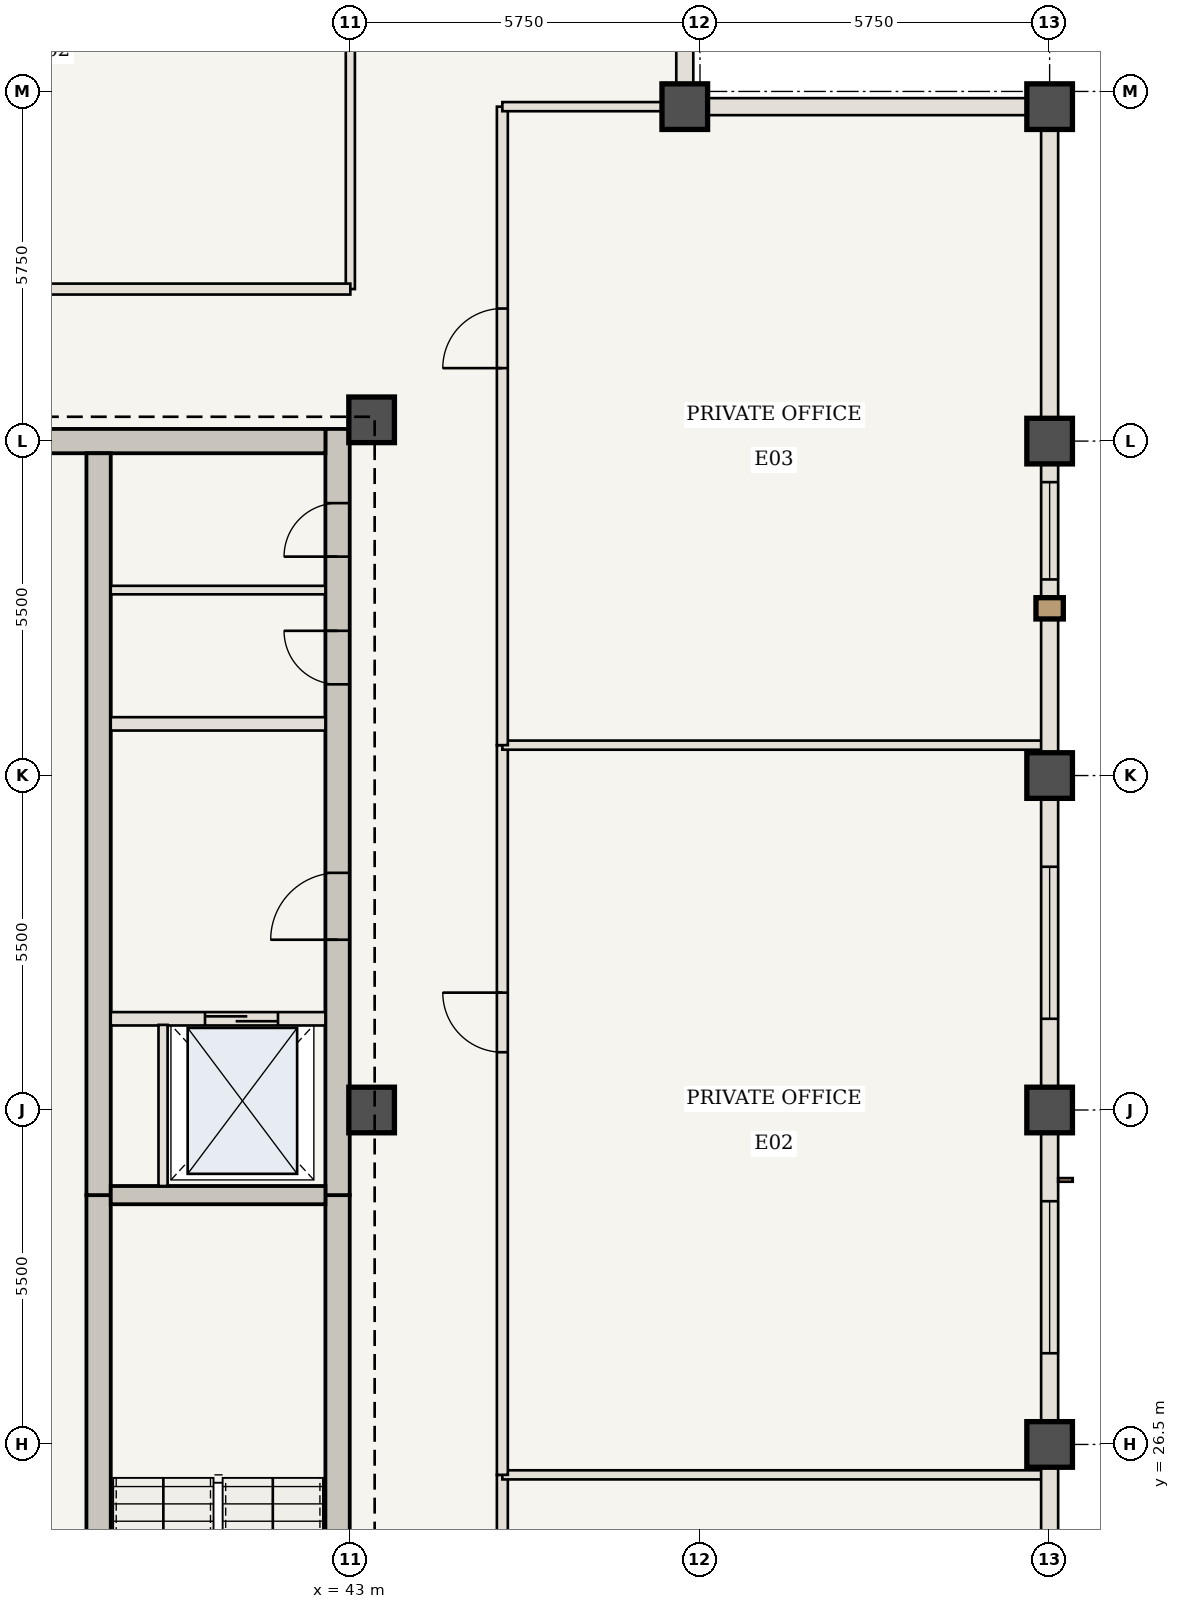
"""IFC4 building model, lengths in metres.
Left out: names, types, materials, properties, quantities, classifications, styles, units other than length and angle.
Written with IfcOpenShell. Run it as: python <this file> out.ifc"""

import sys

from ifc_helpers import new_model, si_unit, direction, frame, frame_2d, origin, origin_2d, place, context, subcontext, project, spatial, rectangle, extrude, element, fill, save


model = new_model("IFC4")
c1 = context("Model", 3, precision=1e-05, world=origin(), true_north=direction((0.0, 1.0)))
c2 = subcontext(c1, "Body", "Model", "MODEL_VIEW")
j1 = project(units=[si_unit("LENGTHUNIT", "METRE"), si_unit("PLANEANGLEUNIT", "RADIAN")], contexts=[c1])
p1 = place(None, origin())
s1 = spatial("IfcSite", under=j1, at=p1, CompositionType="ELEMENT")
p2 = place(p1, origin())
s2 = spatial("IfcBuilding", under=s1, at=p2, CompositionType="ELEMENT")
p3 = place(p2, frame((0.0, 0.0, 262.15)))
s3 = spatial("IfcBuildingStorey", under=s2, at=p3, CompositionType="ELEMENT", Elevation=262.15)
p4 = place(p3, frame((42.79, 20.75, 0.0), z_axis=(0.0, 0.0, 1.0), x_axis=(0.0, 1.0, 0.0)))
e1 = element("IfcWall", 1, at=p4, inside=s3, PredefinedType="SHEAR", context=c2, shape_type="SweptSolid", body=[
    extrude(rectangle(XDim=9.85, YDim=0.4, at=frame_2d((4.925, 0.0))), origin(), (0.0, 0.0, 1.0), 3.85),
])
p5 = place(p4, frame((1.0, 0.0, 0.0)))
e2 = element("IfcOpeningElement", 2, at=p5, cuts=e1, PredefinedType="OPENING", context=c2, shape_type="SweptSolid", body=[
    extrude(rectangle(XDim=1.15, YDim=2.15, at=frame_2d((0.575, 1.075))), frame((0.0, 0.21, 0.0), z_axis=(0.0, -1.0, 0.0), x_axis=(1.0, 0.0, 0.0)), (0.0, 0.0, 1.0), 0.42),
])
p6 = place(p3, frame((42.79, 30.6, 0.0), z_axis=(0.0, 0.0, 1.0), x_axis=(0.0, 1.0, 0.0)))
e3 = element("IfcWall", 3, at=p6, inside=s3, PredefinedType="SHEAR", context=c2, shape_type="SweptSolid", body=[
    extrude(rectangle(XDim=12.6, YDim=0.4, at=frame_2d((6.3, 0.0))), origin(), (0.0, 0.0, 1.0), 3.85),
])
p7 = place(p6, frame((4.2, 0.0, 0.0)))
e4 = element("IfcOpeningElement", 4, at=p7, cuts=e3, PredefinedType="OPENING", context=c2, shape_type="SweptSolid", body=[
    extrude(rectangle(XDim=1.1, YDim=2.15, at=frame_2d((0.55, 1.075))), frame((0.0, 0.21, 0.0), z_axis=(0.0, -1.0, 0.0), x_axis=(1.0, 0.0, 0.0)), (0.0, 0.0, 1.0), 0.42),
])
p8 = place(p6, frame((8.4, 0.0, 0.0)))
e5 = element("IfcOpeningElement", 5, at=p8, cuts=e3, PredefinedType="OPENING", context=c2, shape_type="SweptSolid", body=[
    extrude(rectangle(XDim=0.88, YDim=2.1, at=frame_2d((0.44, 1.05))), frame((0.0, 0.21, 0.0), z_axis=(0.0, -1.0, 0.0), x_axis=(1.0, 0.0, 0.0)), (0.0, 0.0, 1.0), 0.42),
])
p9 = place(p6, frame((10.5, 0.0, 0.0)))
e6 = element("IfcOpeningElement", 6, at=p9, cuts=e3, PredefinedType="OPENING", context=c2, shape_type="SweptSolid", body=[
    extrude(rectangle(XDim=0.88, YDim=2.1, at=frame_2d((0.44, 1.05))), frame((0.0, 0.21, 0.0), z_axis=(0.0, -1.0, 0.0), x_axis=(1.0, 0.0, 0.0)), (0.0, 0.0, 1.0), 0.42),
])
p10 = place(p3, frame((37.75, 43.0, 0.0), z_axis=(0.0, 0.0, 1.0), x_axis=(1.0, 0.0, 0.0)))
e7 = element("IfcWall", 7, at=p10, inside=s3, PredefinedType="SHEAR", context=c2, shape_type="SweptSolid", body=[
    extrude(rectangle(XDim=4.84, YDim=0.4, at=frame_2d((2.42, 0.0))), origin(), (0.0, 0.0, 1.0), 3.85),
])
p11 = place(p3, frame((38.86, 21.15, 0.0), z_axis=(0.0, 0.0, 1.0), x_axis=(0.0, 1.0, 0.0)))
e8 = element("IfcWall", 8, at=p11, inside=s3, PredefinedType="SHEAR", context=c2, shape_type="SweptSolid", body=[
    extrude(rectangle(XDim=9.45, YDim=0.4, at=frame_2d((4.725, 0.0))), origin(), (0.0, 0.0, 1.0), 3.85),
])
p12 = place(p3, frame((38.86, 30.6, 0.0), z_axis=(0.0, 0.0, 1.0), x_axis=(0.0, 1.0, 0.0)))
e9 = element("IfcWall", 9, at=p12, inside=s3, PredefinedType="SHEAR", context=c2, shape_type="SweptSolid", body=[
    extrude(rectangle(XDim=12.2, YDim=0.4, at=frame_2d((6.1, 0.0))), origin(), (0.0, 0.0, 1.0), 3.85),
])
for number, where, z_axis, x_axis in (
    (10, (43.35, 32.0, 0.0), (0.0, 0.0, 1.0), (1.0, 0.0, 0.0)),
    (11, (43.35, 43.35, 0.0), (0.0, 0.0, 1.0), (1.0, 0.0, 0.0)),
    (12, (54.5, 48.5, 0.0), (0.0, 0.0, 1.0), (1.0, 0.0, 0.0)),
    (13, (48.5, 48.5, 0.0), (0.0, 0.0, 1.0), (1.0, 0.0, 0.0)),
    (14, (54.5, 26.5, 0.0), (0.0, 0.0, 1.0), (1.0, 0.0, 0.0)),
    (15, (54.5, 32.0, 0.0), (0.0, 0.0, 1.0), (1.0, 0.0, 0.0)),
    (16, (54.5, 37.5, 0.0), (0.0, 0.0, 1.0), (1.0, 0.0, 0.0)),
    (17, (54.5, 43.0, 0.0), (0.0, 0.0, 1.0), (1.0, 0.0, 0.0)),
):
    element("IfcColumn", number, at=place(p3, frame(where, z_axis=z_axis, x_axis=x_axis)), inside=s3, PredefinedType="COLUMN", context=c2, shape_type="SweptSolid", body=[
        extrude(rectangle(XDim=0.75, YDim=0.75, at=origin_2d()), origin(), (0.0, 0.0, 1.0), 3.85),
    ])
p13 = place(p3, frame((39.06, 30.6, 0.0), z_axis=(0.0, 0.0, 1.0), x_axis=(1.0, 0.0, 0.0)))
e18 = element("IfcWall", 18, at=p13, inside=s3, PredefinedType="SHEAR", context=c2, shape_type="SweptSolid", body=[
    extrude(rectangle(XDim=3.53, YDim=0.3, at=frame_2d((1.765, 0.0))), origin(), (0.0, 0.0, 1.0), 3.43),
])
p14 = place(p3, frame((39.06, 33.5, 0.0), z_axis=(0.0, 0.0, 1.0), x_axis=(1.0, 0.0, 0.0)))
e19 = element("IfcWall", 19, at=p14, inside=s3, PredefinedType="STANDARD", context=c2, shape_type="SweptSolid", body=[
    extrude(rectangle(XDim=3.53, YDim=0.22, at=frame_2d((1.765, 0.0))), origin(), (0.0, 0.0, 1.0), 3.43),
])
p15 = place(p14, frame((1.55, 0.0, 0.0)))
e20 = element("IfcOpeningElement", 20, at=p15, cuts=e19, PredefinedType="OPENING", context=c2, shape_type="SweptSolid", body=[
    extrude(rectangle(XDim=1.2, YDim=2.2, at=frame_2d((0.6, 1.1))), frame((0.0, 0.12, 0.0), z_axis=(0.0, -1.0, 0.0), x_axis=(1.0, 0.0, 0.0)), (0.0, 0.0, 1.0), 0.24),
])
p16 = place(p3, frame((39.92, 30.75, 0.0), z_axis=(0.0, 0.0, 1.0), x_axis=(0.0, 1.0, 0.0)))
e21 = element("IfcWall", 21, at=p16, inside=s3, PredefinedType="STANDARD", context=c2, shape_type="SweptSolid", body=[
    extrude(rectangle(XDim=2.65, YDim=0.15, at=frame_2d((1.325, 0.0))), origin(), (0.0, 0.0, 1.0), 3.43),
])
p17 = place(p3, frame((39.06, 38.35, 0.0), z_axis=(0.0, 0.0, 1.0), x_axis=(1.0, 0.0, 0.0)))
e22 = element("IfcWall", 22, at=p17, inside=s3, PredefinedType="STANDARD", context=c2, shape_type="SweptSolid", body=[
    extrude(rectangle(XDim=3.53, YDim=0.22, at=frame_2d((1.765, 0.0))), origin(), (0.0, 0.0, 1.0), 3.43),
])
p18 = place(p3, frame((39.06, 40.55, 0.0), z_axis=(0.0, 0.0, 1.0), x_axis=(1.0, 0.0, 0.0)))
e23 = element("IfcWall", 23, at=p18, inside=s3, PredefinedType="STANDARD", context=c2, shape_type="SweptSolid", body=[
    extrude(rectangle(XDim=3.53, YDim=0.14, at=frame_2d((1.765, 0.0))), origin(), (0.0, 0.0, 1.0), 3.43),
])
p19 = place(p3, frame((43.0, 45.5, 0.0), z_axis=(0.0, 0.0, 1.0), x_axis=(0.0, 1.0, 0.0)))
e24 = element("IfcWall", 24, at=p19, inside=s3, PredefinedType="STANDARD", context=c2, shape_type="SweptSolid", body=[
    extrude(rectangle(XDim=8.94, YDim=0.15, at=frame_2d((4.47, 0.0))), origin(), (0.0, 0.0, 1.0), 3.43),
])
p20 = place(p3, frame((31.5, 45.5, 0.0), z_axis=(0.0, 0.0, 1.0), x_axis=(1.0, 0.0, 0.0)))
e25 = element("IfcWall", 25, at=p20, inside=s3, PredefinedType="STANDARD", context=c2, shape_type="SweptSolid", body=[
    extrude(rectangle(XDim=11.5, YDim=0.18, at=frame_2d((5.75, 0.0))), origin(), (0.0, 0.0, 1.0), 3.43),
])
p21 = place(p20, frame((5.225, 0.0, 0.0)))
e26 = element("IfcOpeningElement", 26, at=p21, cuts=e25, PredefinedType="OPENING", context=c2, shape_type="SweptSolid", body=[
    extrude(rectangle(XDim=0.98, YDim=2.2, at=frame_2d((0.49, 1.1))), frame((0.0, 0.1, 0.0), z_axis=(0.0, -1.0, 0.0), x_axis=(1.0, 0.0, 0.0)), (0.0, 0.0, 1.0), 0.2),
])
p22 = place(p3, frame((45.5, 15.5, 0.0), z_axis=(0.0, 0.0, 1.0), x_axis=(0.0, 1.0, 0.0)))
e27 = element("IfcWall", 27, at=p22, inside=s3, PredefinedType="STANDARD", context=c2, shape_type="SweptSolid", body=[
    extrude(rectangle(XDim=10.5, YDim=0.18, at=frame_2d((5.25, 0.0))), origin(), (0.0, 0.0, 1.0), 3.43),
])
p23 = place(p22, frame((6.2, 0.0, 0.0)))
e28 = element("IfcOpeningElement", 28, at=p23, cuts=e27, PredefinedType="OPENING", context=c2, shape_type="SweptSolid", body=[
    extrude(rectangle(XDim=0.98, YDim=2.2, at=frame_2d((0.49, 1.1))), frame((0.0, 0.1, 0.0), z_axis=(0.0, -1.0, 0.0), x_axis=(1.0, 0.0, 0.0)), (0.0, 0.0, 1.0), 0.2),
])
p24 = place(p3, frame((45.5, 26.0, 0.0), z_axis=(0.0, 0.0, 1.0), x_axis=(1.0, 0.0, 0.0)))
e29 = element("IfcWall", 29, at=p24, inside=s3, PredefinedType="STANDARD", context=c2, shape_type="SweptSolid", body=[
    extrude(rectangle(XDim=8.94, YDim=0.15, at=frame_2d((4.47, 0.0))), origin(), (0.0, 0.0, 1.0), 3.43),
])
p25 = place(p3, frame((45.5, 26.0, 0.0), z_axis=(0.0, 0.0, 1.0), x_axis=(0.0, 1.0, 0.0)))
e30 = element("IfcWall", 30, at=p25, inside=s3, PredefinedType="STANDARD", context=c2, shape_type="SweptSolid", body=[
    extrude(rectangle(XDim=12.0, YDim=0.18, at=frame_2d((6.0, 0.0))), origin(), (0.0, 0.0, 1.0), 3.43),
])
p26 = place(p25, frame((6.95, 0.0, 0.0)))
e31 = element("IfcOpeningElement", 31, at=p26, cuts=e30, PredefinedType="OPENING", context=c2, shape_type="SweptSolid", body=[
    extrude(rectangle(XDim=0.98, YDim=2.2, at=frame_2d((0.49, 1.1))), frame((0.0, 0.1, 0.0), z_axis=(0.0, -1.0, 0.0), x_axis=(1.0, 0.0, 0.0)), (0.0, 0.0, 1.0), 0.2),
])
p27 = place(p3, frame((45.5, 38.0, 0.0), z_axis=(0.0, 0.0, 1.0), x_axis=(1.0, 0.0, 0.0)))
e32 = element("IfcWall", 32, at=p27, inside=s3, PredefinedType="STANDARD", context=c2, shape_type="SweptSolid", body=[
    extrude(rectangle(XDim=8.94, YDim=0.15, at=frame_2d((4.47, 0.0))), origin(), (0.0, 0.0, 1.0), 3.43),
])
p28 = place(p3, frame((45.5, 38.0, 0.0), z_axis=(0.0, 0.0, 1.0), x_axis=(0.0, 1.0, 0.0)))
e33 = element("IfcWall", 33, at=p28, inside=s3, PredefinedType="STANDARD", context=c2, shape_type="SweptSolid", body=[
    extrude(rectangle(XDim=10.5, YDim=0.18, at=frame_2d((5.25, 0.0))), origin(), (0.0, 0.0, 1.0), 3.43),
])
p29 = place(p28, frame((6.2, 0.0, 0.0)))
e34 = element("IfcOpeningElement", 34, at=p29, cuts=e33, PredefinedType="OPENING", context=c2, shape_type="SweptSolid", body=[
    extrude(rectangle(XDim=0.98, YDim=2.2, at=frame_2d((0.49, 1.1))), frame((0.0, 0.1, 0.0), z_axis=(0.0, -1.0, 0.0), x_axis=(1.0, 0.0, 0.0)), (0.0, 0.0, 1.0), 0.2),
])
p30 = place(p3, frame((45.5, 48.5, 0.0), z_axis=(0.0, 0.0, 1.0), x_axis=(1.0, 0.0, 0.0)))
e35 = element("IfcWall", 35, at=p30, inside=s3, PredefinedType="STANDARD", context=c2, shape_type="SweptSolid", body=[
    extrude(rectangle(XDim=3.0, YDim=0.15, at=frame_2d((1.5, 0.0))), origin(), (0.0, 0.0, 1.0), 3.43),
])
p31 = place(p3, frame((54.5, 26.5, 0.0), z_axis=(0.0, 0.0, 1.0), x_axis=(0.0, -1.0, 0.0)))
e36 = element("IfcWall", 36, at=p31, inside=s3, PredefinedType="USERDEFINED", context=c2, shape_type="SweptSolid", body=[
    extrude(rectangle(XDim=5.5, YDim=0.28, at=frame_2d((2.75, 0.0))), origin(), (0.0, 0.0, 1.0), 2.73),
])
p32 = place(p31, frame((3.225, 0.0, 0.85)))
e37 = element("IfcOpeningElement", 37, at=p32, cuts=e36, PredefinedType="OPENING", context=c2, shape_type="SweptSolid", body=[
    extrude(rectangle(XDim=1.6, YDim=1.68, at=frame_2d((0.8, 0.84))), frame((0.0, 0.15, 0.0), z_axis=(0.0, -1.0, 0.0), x_axis=(1.0, 0.0, 0.0)), (0.0, 0.0, 1.0), 0.3),
])
p33 = place(p3, frame((54.5, 32.0, 0.0), z_axis=(0.0, 0.0, 1.0), x_axis=(0.0, -1.0, 0.0)))
e38 = element("IfcWall", 38, at=p33, inside=s3, PredefinedType="USERDEFINED", context=c2, shape_type="SweptSolid", body=[
    extrude(rectangle(XDim=5.5, YDim=0.28, at=frame_2d((2.75, 0.0))), origin(), (0.0, 0.0, 1.0), 2.73),
])
p34 = place(p33, frame((1.5, 0.0, 0.85)))
e39 = element("IfcOpeningElement", 39, at=p34, cuts=e38, PredefinedType="OPENING", context=c2, shape_type="SweptSolid", body=[
    extrude(rectangle(XDim=2.5, YDim=1.68, at=frame_2d((1.25, 0.84))), frame((0.0, 0.15, 0.0), z_axis=(0.0, -1.0, 0.0), x_axis=(1.0, 0.0, 0.0)), (0.0, 0.0, 1.0), 0.3),
])
p35 = place(p3, frame((54.5, 37.5, 0.0), z_axis=(0.0, 0.0, 1.0), x_axis=(0.0, -1.0, 0.0)))
e40 = element("IfcWall", 40, at=p35, inside=s3, PredefinedType="USERDEFINED", context=c2, shape_type="SweptSolid", body=[
    extrude(rectangle(XDim=5.5, YDim=0.28, at=frame_2d((2.75, 0.0))), origin(), (0.0, 0.0, 1.0), 2.73),
])
p36 = place(p35, frame((1.5, 0.0, 0.85)))
e41 = element("IfcOpeningElement", 41, at=p36, cuts=e40, PredefinedType="OPENING", context=c2, shape_type="SweptSolid", body=[
    extrude(rectangle(XDim=2.5, YDim=1.68, at=frame_2d((1.25, 0.84))), frame((0.0, 0.15, 0.0), z_axis=(0.0, -1.0, 0.0), x_axis=(1.0, 0.0, 0.0)), (0.0, 0.0, 1.0), 0.3),
])
p37 = place(p3, frame((54.5, 43.0, 0.0), z_axis=(0.0, 0.0, 1.0), x_axis=(0.0, -1.0, 0.0)))
e42 = element("IfcWall", 42, at=p37, inside=s3, PredefinedType="USERDEFINED", context=c2, shape_type="SweptSolid", body=[
    extrude(rectangle(XDim=5.5, YDim=0.28, at=frame_2d((2.75, 0.0))), origin(), (0.0, 0.0, 1.0), 2.73),
])
p38 = place(p37, frame((0.675, 0.0, 0.85)))
e43 = element("IfcOpeningElement", 43, at=p38, cuts=e42, PredefinedType="OPENING", context=c2, shape_type="SweptSolid", body=[
    extrude(rectangle(XDim=1.6, YDim=1.68, at=frame_2d((0.8, 0.84))), frame((0.0, 0.15, 0.0), z_axis=(0.0, -1.0, 0.0), x_axis=(1.0, 0.0, 0.0)), (0.0, 0.0, 1.0), 0.3),
])
p39 = place(p3, frame((54.5, 48.5, 0.0), z_axis=(0.0, 0.0, 1.0), x_axis=(0.0, -1.0, 0.0)))
e44 = element("IfcWall", 44, at=p39, inside=s3, PredefinedType="USERDEFINED", context=c2, shape_type="SweptSolid", body=[
    extrude(rectangle(XDim=5.5, YDim=0.28, at=frame_2d((2.75, 0.0))), origin(), (0.0, 0.0, 1.0), 2.73),
])
for number, where, z_axis, x_axis in (
    (45, (48.5, 48.5, 0.0), (0.0, 0.0, 1.0), (1.0, 0.0, 0.0)),
    (46, (48.5, 54.5, 0.0), (0.0, 0.0, 1.0), (0.0, -1.0, 0.0)),
):
    element("IfcWall", number, at=place(p3, frame(where, z_axis=z_axis, x_axis=x_axis)), inside=s3, PredefinedType="USERDEFINED", context=c2, shape_type="SweptSolid", body=[
        extrude(rectangle(XDim=6.0, YDim=0.28, at=frame_2d((3.0, 0.0))), origin(), (0.0, 0.0, 1.0), 2.73),
    ])
p40 = place(p7, origin())
e47 = element("IfcDoor", 47, at=p40, inside=s3, OperationType="SINGLE_SWING_LEFT", PredefinedType="DOOR", context=c2, shape_type="SweptSolid", body=[
    extrude(rectangle(XDim=1.1, YDim=2.15, at=frame_2d((0.55, 1.075))), frame((0.0, 0.025, 0.0), z_axis=(0.0, -1.0, 0.0), x_axis=(1.0, 0.0, 0.0)), (0.0, 0.0, 1.0), 0.05),
])
fill(e4, e47)
p41 = place(p8, origin())
e48 = element("IfcDoor", 48, at=p41, inside=s3, OperationType="SINGLE_SWING_RIGHT", PredefinedType="DOOR", context=c2, shape_type="SweptSolid", body=[
    extrude(rectangle(XDim=0.88, YDim=2.1, at=frame_2d((0.44, 1.05))), frame((0.0, 0.025, 0.0), z_axis=(0.0, -1.0, 0.0), x_axis=(1.0, 0.0, 0.0)), (0.0, 0.0, 1.0), 0.05),
])
fill(e5, e48)
p42 = place(p9, origin())
e49 = element("IfcDoor", 49, at=p42, inside=s3, OperationType="SINGLE_SWING_LEFT", PredefinedType="DOOR", context=c2, shape_type="SweptSolid", body=[
    extrude(rectangle(XDim=0.88, YDim=2.1, at=frame_2d((0.44, 1.05))), frame((0.0, 0.025, 0.0), z_axis=(0.0, -1.0, 0.0), x_axis=(1.0, 0.0, 0.0)), (0.0, 0.0, 1.0), 0.05),
])
fill(e6, e49)
p43 = place(p15, origin())
e50 = element("IfcDoor", 50, at=p43, inside=s3, OperationType="DOUBLE_DOOR_SLIDING", PredefinedType="DOOR", context=c2, shape_type="SweptSolid", body=[
    extrude(rectangle(XDim=1.2, YDim=2.2, at=frame_2d((0.6, 1.1))), frame((0.0, 0.025, 0.0), z_axis=(0.0, -1.0, 0.0), x_axis=(1.0, 0.0, 0.0)), (0.0, 0.0, 1.0), 0.05),
])
fill(e20, e50)
p44 = place(p26, origin())
e51 = element("IfcDoor", 51, at=p44, inside=s3, OperationType="SINGLE_SWING_RIGHT", PredefinedType="DOOR", context=c2, shape_type="SweptSolid", body=[
    extrude(rectangle(XDim=0.98, YDim=2.2, at=frame_2d((0.49, 1.1))), frame((0.0, 0.025, 0.0), z_axis=(0.0, -1.0, 0.0), x_axis=(1.0, 0.0, 0.0)), (0.0, 0.0, 1.0), 0.05),
])
fill(e31, e51)
p45 = place(p29, origin())
e52 = element("IfcDoor", 52, at=p45, inside=s3, OperationType="SINGLE_SWING_LEFT", PredefinedType="DOOR", context=c2, shape_type="SweptSolid", body=[
    extrude(rectangle(XDim=0.98, YDim=2.2, at=frame_2d((0.49, 1.1))), frame((0.0, 0.025, 0.0), z_axis=(0.0, -1.0, 0.0), x_axis=(1.0, 0.0, 0.0)), (0.0, 0.0, 1.0), 0.05),
])
fill(e34, e52)
p46 = place(p34, origin())
e53 = element("IfcWindow", 53, at=p46, inside=s3, PartitioningType="SINGLE_PANEL", PredefinedType="WINDOW", context=c2, shape_type="SweptSolid", body=[
    extrude(rectangle(XDim=2.5, YDim=1.68, at=frame_2d((1.25, 0.84))), frame((0.0, 0.03, 0.0), z_axis=(0.0, -1.0, 0.0), x_axis=(1.0, 0.0, 0.0)), (0.0, 0.0, 1.0), 0.06),
])
fill(e39, e53)
p47 = place(p36, origin())
e54 = element("IfcWindow", 54, at=p47, inside=s3, PartitioningType="SINGLE_PANEL", PredefinedType="WINDOW", context=c2, shape_type="SweptSolid", body=[
    extrude(rectangle(XDim=2.5, YDim=1.68, at=frame_2d((1.25, 0.84))), frame((0.0, 0.03, 0.0), z_axis=(0.0, -1.0, 0.0), x_axis=(1.0, 0.0, 0.0)), (0.0, 0.0, 1.0), 0.06),
])
fill(e41, e54)
p48 = place(p38, origin())
e55 = element("IfcWindow", 55, at=p48, inside=s3, PartitioningType="SINGLE_PANEL", PredefinedType="WINDOW", context=c2, shape_type="SweptSolid", body=[
    extrude(rectangle(XDim=1.6, YDim=1.68, at=frame_2d((0.8, 0.84))), frame((0.0, 0.03, 0.0), z_axis=(0.0, -1.0, 0.0), x_axis=(1.0, 0.0, 0.0)), (0.0, 0.0, 1.0), 0.06),
])
fill(e43, e55)
save(model, sys.argv[1])
